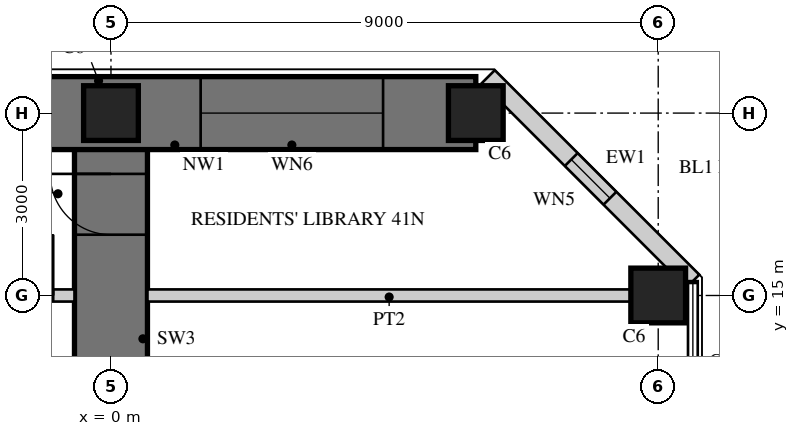
"""IFC4 building model, lengths in metres.
Left out: names, types, materials, properties, quantities, classifications, styles, units other than length and angle.
Written with IfcOpenShell. Run it as: python <this file> out.ifc"""

import sys

from ifc_helpers import new_model, si_unit, direction, frame, frame_2d, origin, origin_2d, place, context, subcontext, project, spatial, rectangle, hollow_rectangle, extrude, element, fill, save


model = new_model("IFC4")
c1 = context("Model", 3, precision=1e-05, world=origin(), true_north=direction((0.0, 1.0)))
c2 = subcontext(c1, "Body", "Model", "MODEL_VIEW")
j1 = project(units=[si_unit("LENGTHUNIT", "METRE"), si_unit("PLANEANGLEUNIT", "RADIAN")], contexts=[c1])
p1 = place(None, origin())
s1 = spatial("IfcSite", under=j1, at=p1, CompositionType="ELEMENT")
p2 = place(p1, origin())
s2 = spatial("IfcBuilding", under=s1, at=p2, CompositionType="ELEMENT")
p3 = place(p2, frame((0.0, 0.0, 169.5)))
s3 = spatial("IfcBuildingStorey", under=s2, at=p3, CompositionType="ELEMENT", Elevation=169.5)
p4 = place(p3, frame((0.0, 9.0, 0.0), z_axis=(0.0, 0.0, 1.0), x_axis=(0.0, 1.0, 0.0)))
e1 = element("IfcWall", 1, at=p4, inside=s3, PredefinedType="SHEAR", context=c2, shape_type="SweptSolid", body=[
    extrude(rectangle(XDim=9.0, YDim=1.2, at=frame_2d((4.5, 0.0))), origin(), (0.0, 0.0, 1.0), 3.4),
])
p5 = place(p4, frame((3.95, 0.0, 0.0)))
e2 = element("IfcOpeningElement", 2, at=p5, cuts=e1, PredefinedType="OPENING", context=c2, shape_type="SweptSolid", body=[
    extrude(rectangle(XDim=1.0, YDim=2.15, at=frame_2d((0.5, 1.075))), frame((0.0, 0.61, 0.0), z_axis=(0.0, -1.0, 0.0), x_axis=(1.0, 0.0, 0.0)), (0.0, 0.0, 1.0), 1.22),
])
p6 = place(p4, frame((7.0, 0.0, 0.0)))
e3 = element("IfcOpeningElement", 3, at=p6, cuts=e1, PredefinedType="OPENING", context=c2, shape_type="SweptSolid", body=[
    extrude(rectangle(XDim=1.0, YDim=2.2, at=frame_2d((0.5, 1.1))), frame((0.0, 0.61, 0.0), z_axis=(0.0, -1.0, 0.0), x_axis=(1.0, 0.0, 0.0)), (0.0, 0.0, 1.0), 1.22),
])
p7 = place(p3, frame((6.0, 18.0, 0.0), z_axis=(0.0, 0.0, 1.0), x_axis=(-1.0, 0.0, 0.0)))
e4 = element("IfcWall", 4, at=p7, inside=s3, PredefinedType="SHEAR", context=c2, shape_type="SweptSolid", body=[
    extrude(rectangle(XDim=12.0, YDim=1.2, at=frame_2d((6.0, 0.0))), origin(), (0.0, 0.0, 1.0), 3.4),
])
p8 = place(p7, frame((1.525, 0.0, 0.6)))
e5 = element("IfcOpeningElement", 5, at=p8, cuts=e4, PredefinedType="OPENING", context=c2, shape_type="SweptSolid", body=[
    extrude(rectangle(XDim=3.0, YDim=2.4, at=frame_2d((1.5, 1.2))), frame((0.0, 0.61, 0.0), z_axis=(0.0, -1.0, 0.0), x_axis=(1.0, 0.0, 0.0)), (0.0, 0.0, 1.0), 1.22),
])
p9 = place(p7, frame((7.475, 0.0, 0.6)))
e6 = element("IfcOpeningElement", 6, at=p9, cuts=e4, PredefinedType="OPENING", context=c2, shape_type="SweptSolid", body=[
    extrude(rectangle(XDim=3.0, YDim=2.4, at=frame_2d((1.5, 1.2))), frame((0.0, 0.61, 0.0), z_axis=(0.0, -1.0, 0.0), x_axis=(1.0, 0.0, 0.0)), (0.0, 0.0, 1.0), 1.22),
])
for number, where, z_axis, x_axis in (
    (7, (9.0, 15.0, 0.0), (0.0, 0.0, 1.0), (1.0, 0.0, 0.0)),
    (8, (6.0, 18.0, 0.0), (0.0, 0.0, 1.0), (1.0, 0.0, 0.0)),
    (9, (0.0, 18.0, 0.0), (0.0, 0.0, 1.0), (1.0, 0.0, 0.0)),
):
    element("IfcColumn", number, at=place(p3, frame(where, z_axis=z_axis, x_axis=x_axis)), inside=s3, PredefinedType="COLUMN", context=c2, shape_type="SweptSolid", body=[
        extrude(rectangle(XDim=0.9, YDim=0.9, at=origin_2d()), origin(), (0.0, 0.0, 1.0), 3.4),
    ])
p10 = place(p3, frame((9.57, 15.236, 0.0), z_axis=(0.0, 0.0, 1.0), x_axis=(-0.707106781187, 0.707106781187, 0.0)))
e10 = element("IfcWall", 10, at=p10, inside=s3, PredefinedType="SOLIDWALL", context=c2, shape_type="SweptSolid", body=[
    extrude(rectangle(XDim=4.757, YDim=0.3, at=frame_2d((2.379, 0.0))), origin(), (0.0, 0.0, 1.0), 3.22),
])
p11 = place(p10, frame((1.929, 0.0, 0.3)))
e11 = element("IfcOpeningElement", 11, at=p11, cuts=e10, PredefinedType="OPENING", context=c2, shape_type="SweptSolid", body=[
    extrude(rectangle(XDim=0.9, YDim=2.4, at=frame_2d((0.45, 1.2))), frame((0.0, 0.16, 0.0), z_axis=(0.0, -1.0, 0.0), x_axis=(1.0, 0.0, 0.0)), (0.0, 0.0, 1.0), 0.32),
])
p12 = place(p3, frame((8.55, 15.0, 0.0), z_axis=(0.0, 0.0, 1.0), x_axis=(-1.0, 0.0, 0.0)))
e12 = element("IfcWall", 12, at=p12, inside=s3, PredefinedType="SOLIDWALL", context=c2, shape_type="SweptSolid", body=[
    extrude(rectangle(XDim=7.95, YDim=0.2, at=frame_2d((3.975, 0.0))), origin(), (0.0, 0.0, 1.0), 2.47),
])
p13 = place(p3, frame((-0.6, 15.0, 0.0), z_axis=(0.0, 0.0, 1.0), x_axis=(-1.0, 0.0, 0.0)))
e13 = element("IfcWall", 13, at=p13, inside=s3, PredefinedType="SOLIDWALL", context=c2, shape_type="SweptSolid", body=[
    extrude(rectangle(XDim=7.95, YDim=0.2, at=frame_2d((3.975, 0.0))), origin(), (0.0, 0.0, 1.0), 2.47),
])
p14 = place(p13, frame((0.35, 0.0, 0.0)))
e14 = element("IfcOpeningElement", 14, at=p14, cuts=e13, PredefinedType="OPENING", context=c2, shape_type="SweptSolid", body=[
    extrude(rectangle(XDim=1.0, YDim=2.2, at=frame_2d((0.5, 1.1))), frame((0.0, 0.11, 0.0), z_axis=(0.0, -1.0, 0.0), x_axis=(1.0, 0.0, 0.0)), (0.0, 0.0, 1.0), 0.22),
])
p15 = place(p11, origin())
e15 = element("IfcWindow", 15, at=p15, inside=s3, PartitioningType="SINGLE_PANEL", PredefinedType="WINDOW", context=c2, shape_type="SweptSolid", body=[
    extrude(hollow_rectangle(XDim=0.9, YDim=2.4, WallThickness=0.06, at=frame_2d((0.45, 1.2))), frame((0.0, 0.03, 0.0), z_axis=(0.0, -1.0, 0.0), x_axis=(1.0, 0.0, 0.0)), (0.0, 0.0, 1.0), 0.06),
    extrude(rectangle(XDim=0.779, YDim=2.279, at=frame_2d((0.45, 1.2))), frame((0.0, 0.03, 0.0), z_axis=(0.0, -1.0, 0.0), x_axis=(1.0, 0.0, 0.0)), (0.0, 0.0, 1.0), 0.06),
])
fill(e11, e15)
p16 = place(p8, origin())
e16 = element("IfcWindow", 16, at=p16, inside=s3, PartitioningType="SINGLE_PANEL", PredefinedType="WINDOW", context=c2, shape_type="SweptSolid", body=[
    extrude(hollow_rectangle(XDim=3.0, YDim=2.4, WallThickness=0.06, at=frame_2d((1.5, 1.2))), frame((0.0, 0.03, 0.0), z_axis=(0.0, -1.0, 0.0), x_axis=(1.0, 0.0, 0.0)), (0.0, 0.0, 1.0), 0.06),
    extrude(rectangle(XDim=2.879, YDim=2.279, at=frame_2d((1.5, 1.2))), frame((0.0, 0.03, 0.0), z_axis=(0.0, -1.0, 0.0), x_axis=(1.0, 0.0, 0.0)), (0.0, 0.0, 1.0), 0.06),
])
fill(e5, e16)
p17 = place(p14, frame((1.0, 0.0, 0.0), z_axis=(0.0, 0.0, 1.0), x_axis=(-1.0, 0.0, 0.0)))
e17 = element("IfcDoor", 17, at=p17, inside=s3, OperationType="SINGLE_SWING_RIGHT", PredefinedType="DOOR", context=c2, shape_type="SweptSolid", body=[
    extrude(rectangle(XDim=1.0, YDim=2.2, at=frame_2d((0.5, 1.1))), frame((0.0, 0.025, 0.0), z_axis=(0.0, -1.0, 0.0), x_axis=(1.0, 0.0, 0.0)), (0.0, 0.0, 1.0), 0.05),
])
fill(e14, e17)
p18 = place(p6, origin())
e18 = element("IfcDoor", 18, at=p18, inside=s3, OperationType="SINGLE_SWING_RIGHT", PredefinedType="DOOR", context=c2, shape_type="SweptSolid", body=[
    extrude(rectangle(XDim=1.0, YDim=2.2, at=frame_2d((0.5, 1.1))), frame((0.0, 0.025, 0.0), z_axis=(0.0, -1.0, 0.0), x_axis=(1.0, 0.0, 0.0)), (0.0, 0.0, 1.0), 0.05),
])
fill(e3, e18)
save(model, sys.argv[1])
